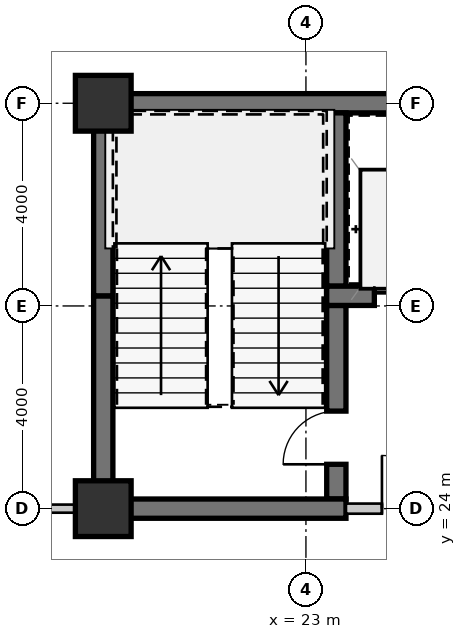
"""IFC4 building model, lengths in metres.
Left out: names, types, materials, properties, quantities, classifications, styles, units other than length and angle.
Written with IfcOpenShell. Run it as: python <this file> out.ifc"""

import sys

from ifc_helpers import new_model, si_unit, direction, frame, frame_2d, origin, origin_2d, place, context, subcontext, project, spatial, rectangle, extrude, source, transform, mapped, element, fill, save


model = new_model("IFC4")
c1 = context("Model", 3, precision=1e-05, world=origin(), true_north=direction((0.0, 1.0)))
c2 = subcontext(c1, "Body", "Model", "MODEL_VIEW")
j1 = project(units=[si_unit("LENGTHUNIT", "METRE"), si_unit("PLANEANGLEUNIT", "RADIAN")], contexts=[c1])
p1 = place(None, origin())
s1 = spatial("IfcSite", under=j1, at=p1, CompositionType="ELEMENT")
p2 = place(p1, origin())
s2 = spatial("IfcBuilding", under=s1, at=p2, CompositionType="ELEMENT")
p3 = place(p2, frame((0.0, 0.0, 16.8)))
s3 = spatial("IfcBuildingStorey", under=s2, at=p3, CompositionType="ELEMENT", Elevation=16.8)
m1 = source(origin(), c2, "Body", "SweptSolid", [
    extrude(rectangle(XDim=1.1, YDim=1.1, at=origin_2d()), origin(), (0.0, 0.0, 1.0), 3.15),
])
for number, where, z_axis, x_axis in (
    (1, (19.0, 24.0, 0.0), (0.0, 0.0, 1.0), (1.0, 0.0, 0.0)),
    (2, (19.0, 32.0, 0.0), (0.0, 0.0, 1.0), (1.0, 0.0, 0.0)),
):
    element("IfcColumn", number, at=place(p3, frame(where, z_axis=z_axis, x_axis=x_axis)), inside=s3, PredefinedType="COLUMN", context=c2, shape_type="MappedRepresentation", body=[
        mapped(m1, transform((0.0, 0.0, 0.0), scale=1.0)),
    ])
m2 = source(origin(), c2, "Body", "SweptSolid", [
    extrude(rectangle(XDim=9.19, YDim=0.38, at=frame_2d((4.595, 0.0))), origin(), (0.0, 0.0, 1.0), 2.93),
])
p4 = place(p3, frame((18.81, 32.0, 0.0), z_axis=(0.0, 0.0, 1.0), x_axis=(1.0, 0.0, 0.0)))
e3 = element("IfcWall", 3, at=p4, inside=s3, PredefinedType="SHEAR", context=c2, shape_type="MappedRepresentation", body=[
    mapped(m2, transform((0.0, 0.0, 0.0), scale=1.0)),
])
m3 = source(origin(), c2, "Body", "SweptSolid", [
    extrude(rectangle(XDim=4.01, YDim=0.38, at=frame_2d((2.005, 0.0))), origin(), (0.0, 0.0, 1.0), 2.93),
])
p5 = place(p3, frame((19.0, 24.19, 0.0), z_axis=(0.0, 0.0, 1.0), x_axis=(0.0, 1.0, 0.0)))
e4 = element("IfcWall", 4, at=p5, inside=s3, PredefinedType="SHEAR", context=c2, shape_type="MappedRepresentation", body=[
    mapped(m3, transform((0.0, 0.0, 0.0), scale=1.0)),
])
m4 = source(origin(), c2, "Body", "SweptSolid", [
    extrude(rectangle(XDim=3.61, YDim=0.38, at=frame_2d((1.805, 0.0))), origin(), (0.0, 0.0, 1.0), 2.93),
])
p6 = place(p3, frame((19.0, 28.2, 0.0), z_axis=(0.0, 0.0, 1.0), x_axis=(0.0, 1.0, 0.0)))
e5 = element("IfcWall", 5, at=p6, inside=s3, PredefinedType="SHEAR", context=c2, shape_type="MappedRepresentation", body=[
    mapped(m4, transform((0.0, 0.0, 0.0), scale=1.0)),
])
m5 = source(origin(), c2, "Body", "SweptSolid", [
    extrude(rectangle(XDim=3.42, YDim=0.38, at=frame_2d((1.71, 0.0))), origin(), (0.0, 0.0, 1.0), 2.93),
])
p7 = place(p3, frame((23.6, 28.39, 0.0), z_axis=(0.0, 0.0, 1.0), x_axis=(0.0, 1.0, 0.0)))
e6 = element("IfcWall", 6, at=p7, inside=s3, PredefinedType="SHEAR", context=c2, shape_type="MappedRepresentation", body=[
    mapped(m5, transform((0.0, 0.0, 0.0), scale=1.0)),
])
m6 = source(origin(), c2, "Body", "SweptSolid", [
    extrude(rectangle(XDim=3.82, YDim=0.38, at=frame_2d((1.91, 0.0))), origin(), (0.0, 0.0, 1.0), 2.93),
])
p8 = place(p3, frame((23.6, 24.19, 0.0), z_axis=(0.0, 0.0, 1.0), x_axis=(0.0, 1.0, 0.0)))
e7 = element("IfcWall", 7, at=p8, inside=s3, PredefinedType="SHEAR", context=c2, shape_type="MappedRepresentation", body=[
    mapped(m6, transform((0.0, 0.0, 0.0), scale=1.0)),
])
m7 = source(origin(), c2, "Body", "SweptSolid", [
    extrude(rectangle(XDim=1.05, YDim=2.1, at=frame_2d((0.525, 1.05))), frame((0.0, 0.2, 0.0), z_axis=(0.0, -1.0, 0.0), x_axis=(1.0, 0.0, 0.0)), (0.0, 0.0, 1.0), 0.4),
])
p9 = place(p8, frame((0.685, 0.0, 0.0)))
e8 = element("IfcOpeningElement", 8, at=p9, cuts=e7, PredefinedType="OPENING", context=c2, shape_type="MappedRepresentation", body=[
    mapped(m7, transform((0.0, 0.0, 0.0), scale=1.0)),
])
m8 = source(origin(), c2, "Body", "SweptSolid", [
    extrude(rectangle(XDim=4.98, YDim=0.38, at=frame_2d((2.49, 0.0))), origin(), (0.0, 0.0, 1.0), 2.93),
])
p10 = place(p3, frame((18.81, 24.0, 0.0), z_axis=(0.0, 0.0, 1.0), x_axis=(1.0, 0.0, 0.0)))
e9 = element("IfcWall", 9, at=p10, inside=s3, PredefinedType="SHEAR", context=c2, shape_type="MappedRepresentation", body=[
    mapped(m8, transform((0.0, 0.0, 0.0), scale=1.0)),
])
m9 = source(origin(), c2, "Body", "SweptSolid", [
    extrude(rectangle(XDim=2.98, YDim=0.38, at=frame_2d((1.49, 0.0))), origin(), (0.0, 0.0, 1.0), 2.93),
])
p11 = place(p3, frame((23.41, 28.2, 0.0), z_axis=(0.0, 0.0, 1.0), x_axis=(1.0, 0.0, 0.0)))
e10 = element("IfcWall", 10, at=p11, inside=s3, PredefinedType="SHEAR", context=c2, shape_type="MappedRepresentation", body=[
    mapped(m9, transform((0.0, 0.0, 0.0), scale=1.0)),
])
m10 = source(origin(), c2, "Body", "SweptSolid", [
    extrude(rectangle(XDim=1.1, YDim=2.15, at=frame_2d((0.55, 1.075))), frame((0.0, 0.2, 0.0), z_axis=(0.0, -1.0, 0.0), x_axis=(1.0, 0.0, 0.0)), (0.0, 0.0, 1.0), 0.4),
])
p12 = place(p11, frame((0.94, 0.0, 0.0)))
e11 = element("IfcOpeningElement", 11, at=p12, cuts=e10, PredefinedType="OPENING", context=c2, shape_type="MappedRepresentation", body=[
    mapped(m10, transform((0.0, 0.0, 0.0), scale=1.0)),
])
m11 = source(origin(), c2, "Body", "SweptSolid", [
    extrude(rectangle(XDim=2.66, YDim=0.2, at=frame_2d((1.33, 0.0))), origin(), (0.0, 0.0, 1.0), 2.47),
])
p13 = place(p3, frame((23.79, 24.0, 0.0), z_axis=(0.0, 0.0, 1.0), x_axis=(1.0, 0.0, 0.0)))
e12 = element("IfcWall", 12, at=p13, inside=s3, PredefinedType="SOLIDWALL", context=c2, shape_type="MappedRepresentation", body=[
    mapped(m11, transform((0.0, 0.0, 0.0), scale=1.0)),
])
m12 = source(origin(), c2, "Body", "SweptSolid", [
    extrude(rectangle(XDim=1.05, YDim=2.1, at=frame_2d((0.525, 1.05))), frame((0.0, 0.11, 0.0), z_axis=(0.0, -1.0, 0.0), x_axis=(1.0, 0.0, 0.0)), (0.0, 0.0, 1.0), 0.22),
])
p14 = place(p13, frame((0.71, 0.0, 0.0)))
e13 = element("IfcOpeningElement", 13, at=p14, cuts=e12, PredefinedType="OPENING", context=c2, shape_type="MappedRepresentation", body=[
    mapped(m12, transform((0.0, 0.0, 0.0), scale=1.0)),
])
m13 = source(origin(), c2, "Body", "SweptSolid", [
    extrude(rectangle(XDim=4.13, YDim=0.16, at=frame_2d((2.065, 0.0))), origin(), (0.0, 0.0, 1.0), 2.93),
])
p15 = place(p3, frame((14.68, 24.0, 0.0), z_axis=(0.0, 0.0, 1.0), x_axis=(1.0, 0.0, 0.0)))
e14 = element("IfcWall", 14, at=p15, inside=s3, PredefinedType="PARTITIONING", context=c2, shape_type="MappedRepresentation", body=[
    mapped(m13, transform((0.0, 0.0, 0.0), scale=1.0)),
])
m14 = source(origin(), c2, "Body", "SweptSolid", [
    extrude(rectangle(XDim=0.92, YDim=2.1, at=frame_2d((0.46, 1.05))), frame((0.0, 0.09, 0.0), z_axis=(0.0, -1.0, 0.0), x_axis=(1.0, 0.0, 0.0)), (0.0, 0.0, 1.0), 0.18),
])
p16 = place(p15, frame((1.69, 0.0, 0.0)))
e15 = element("IfcOpeningElement", 15, at=p16, cuts=e14, PredefinedType="OPENING", context=c2, shape_type="MappedRepresentation", body=[
    mapped(m14, transform((0.0, 0.0, 0.0), scale=1.0)),
])
m15 = source(origin(), c2, "Body", "SweptSolid", [
    extrude(rectangle(XDim=1.05, YDim=2.1, at=frame_2d((0.525, 1.05))), frame((0.0, 0.025, 0.0), z_axis=(0.0, -1.0, 0.0), x_axis=(1.0, 0.0, 0.0)), (0.0, 0.0, 1.0), 0.05),
])
p17 = place(p9, origin())
e16 = element("IfcDoor", 16, at=p17, inside=s3, OperationType="SINGLE_SWING_LEFT", PredefinedType="DOOR", context=c2, shape_type="MappedRepresentation", body=[
    mapped(m15, transform((0.0, 0.0, 0.0), scale=1.0)),
])
fill(e8, e16)
m16 = source(origin(), c2, "Body", "SweptSolid", [
    extrude(rectangle(XDim=1.1, YDim=2.15, at=frame_2d((0.55, 1.075))), frame((0.0, 0.025, 0.0), z_axis=(0.0, -1.0, 0.0), x_axis=(1.0, 0.0, 0.0)), (0.0, 0.0, 1.0), 0.05),
])
p18 = place(p12, origin())
e17 = element("IfcDoor", 17, at=p18, inside=s3, OperationType="SLIDING_TO_LEFT", PredefinedType="DOOR", context=c2, shape_type="MappedRepresentation", body=[
    mapped(m16, transform((0.0, 0.0, 0.0), scale=1.0)),
])
fill(e11, e17)
p19 = place(p14, origin())
e18 = element("IfcDoor", 18, at=p19, inside=s3, OperationType="SINGLE_SWING_LEFT", PredefinedType="DOOR", context=c2, shape_type="MappedRepresentation", body=[
    mapped(m15, transform((0.0, 0.0, 0.0), scale=1.0)),
])
fill(e13, e18)
save(model, sys.argv[1])
